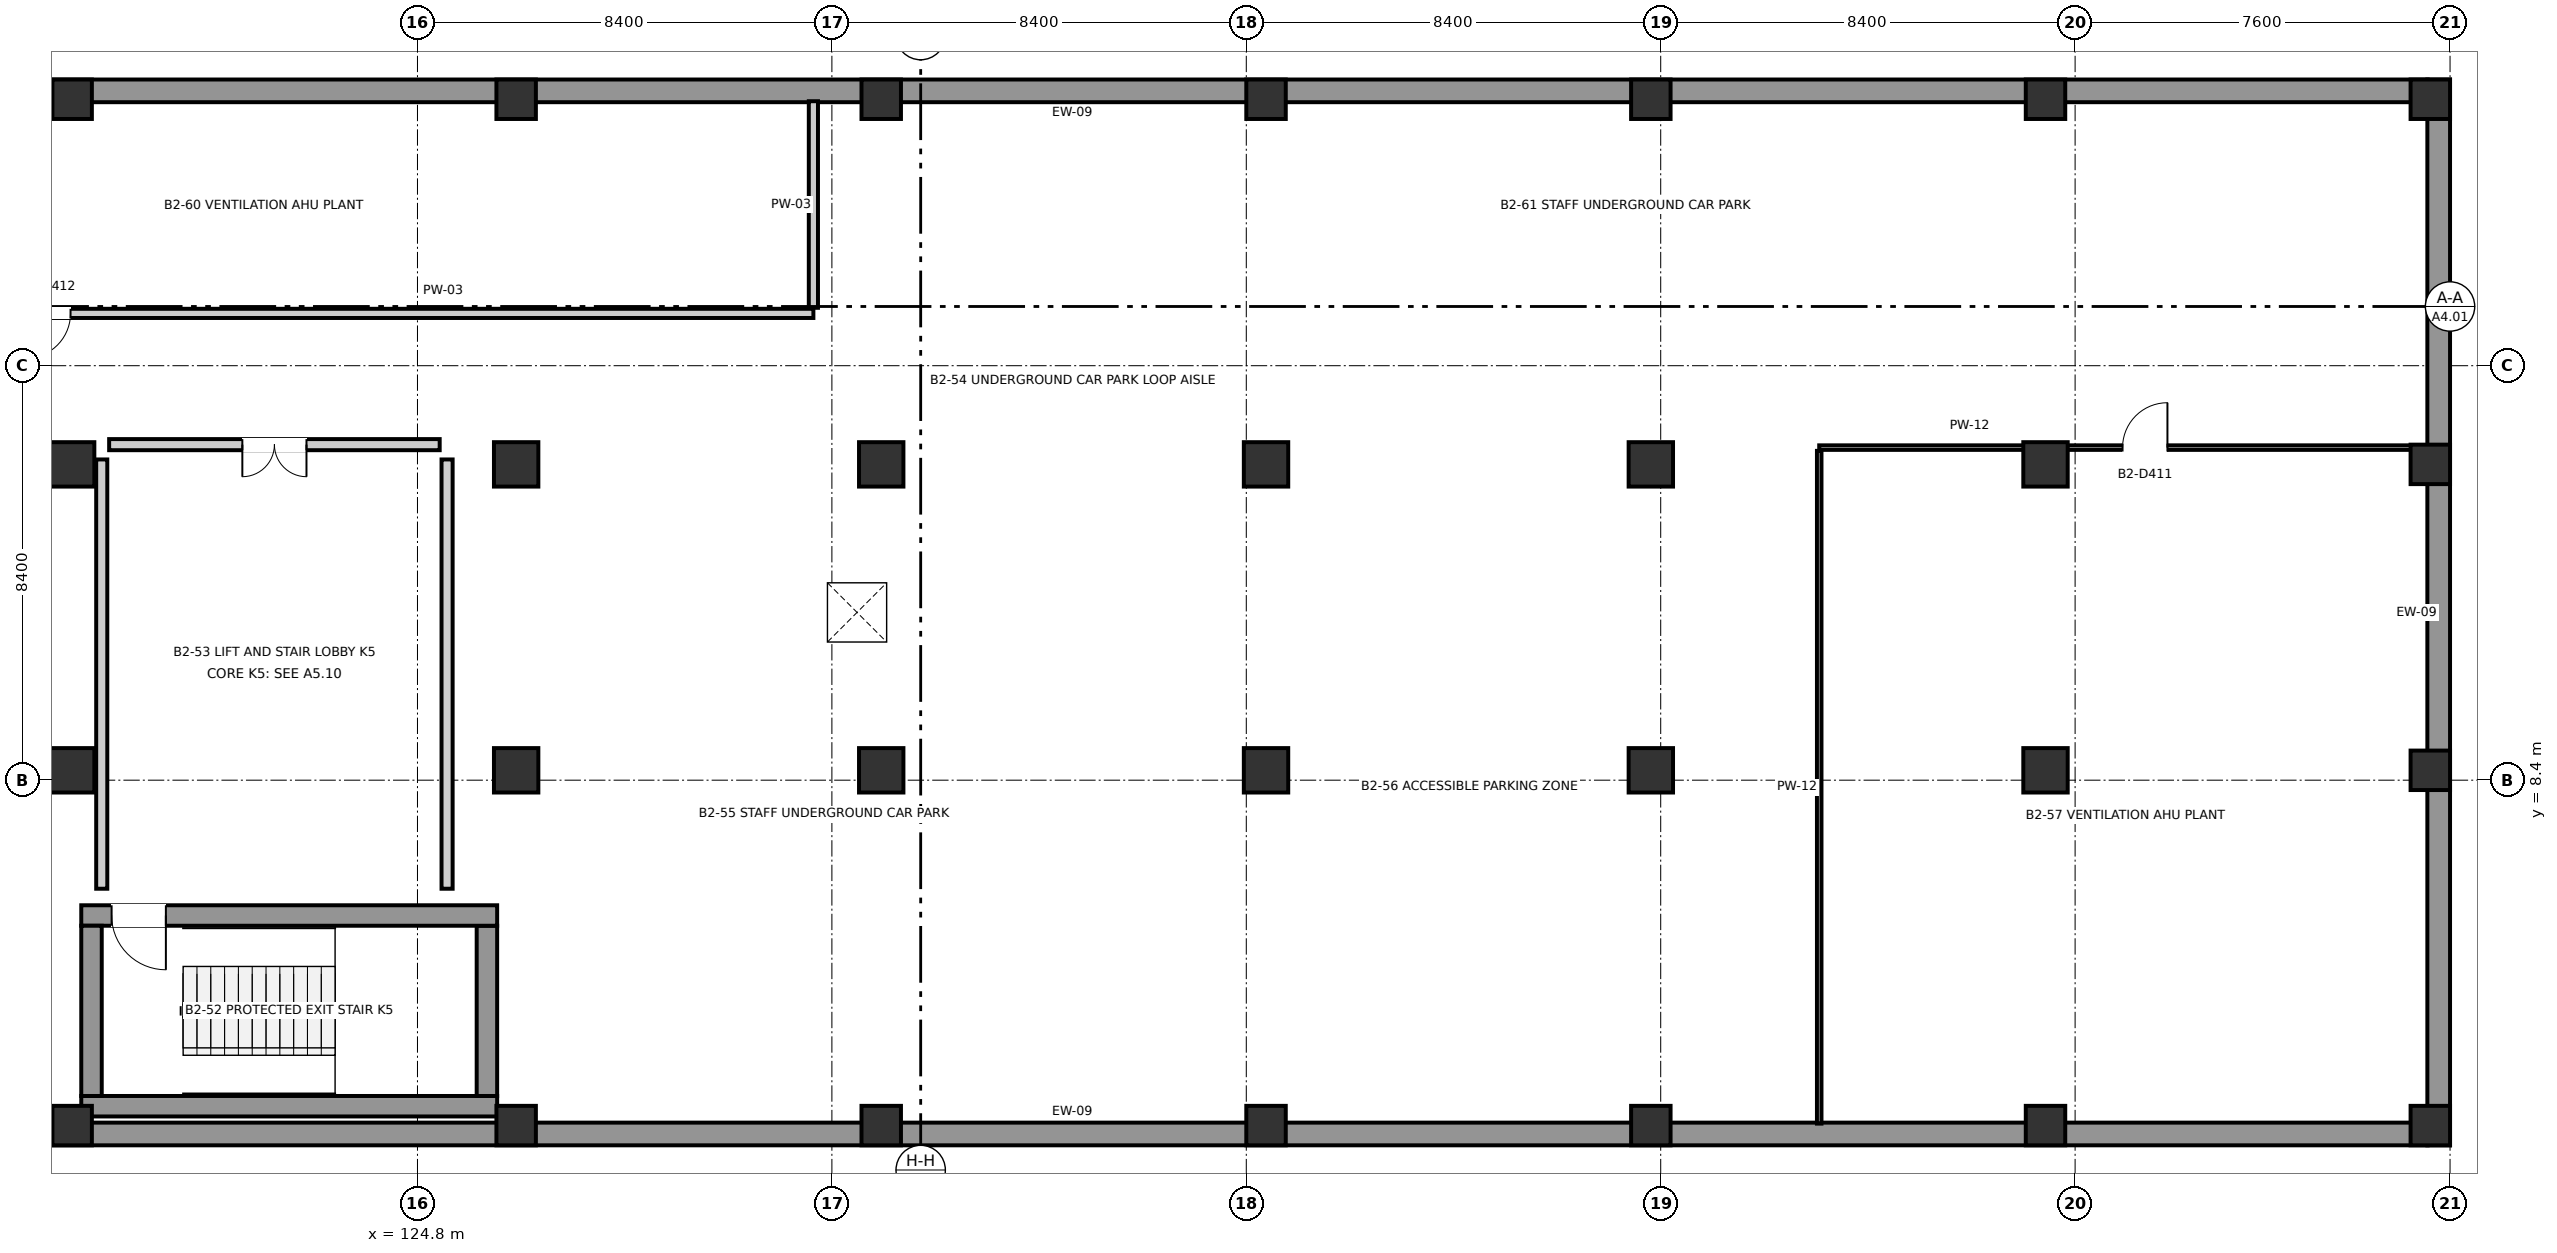
"""IFC4 building model, lengths in metres.
Left out: names, types, materials, properties, quantities, classifications, styles, units other than length and angle.
Written with IfcOpenShell. Run it as: python <this file> out.ifc"""

import sys

from ifc_helpers import new_model, si_unit, direction, frame, frame_2d, origin, origin_2d, place, context, subcontext, project, spatial, rectangle, extrude, element, fill, save


model = new_model("IFC4")
c1 = context("Model", 3, precision=1e-05, world=origin(), true_north=direction((0.0, 1.0)))
c2 = subcontext(c1, "Body", "Model", "MODEL_VIEW")
j1 = project(units=[si_unit("LENGTHUNIT", "METRE"), si_unit("PLANEANGLEUNIT", "RADIAN")], contexts=[c1])
p1 = place(None, origin())
s1 = spatial("IfcSite", under=j1, at=p1, CompositionType="ELEMENT")
p2 = place(p1, origin())
s2 = spatial("IfcBuilding", under=s1, at=p2, CompositionType="ELEMENT")
p3 = place(p2, frame((0.0, 0.0, -8.4)))
s3 = spatial("IfcBuildingStorey", under=s2, at=p3, CompositionType="ELEMENT", Elevation=-8.4)
p4 = place(p3, frame((117.8, 1.4, 0.0), z_axis=(0.0, 0.0, 1.0), x_axis=(1.0, 0.0, 0.0)))
e1 = element("IfcColumn", 1, at=p4, inside=s3, PredefinedType="COLUMN", context=c2, shape_type="SweptSolid", body=[
    extrude(rectangle(XDim=0.8, YDim=0.8, at=origin_2d()), origin(), (0.0, 0.0, 1.0), 4.2),
])
for number, where, z_axis, x_axis in (
    (2, (117.8, 8.6, 0.0), (0.0, 0.0, 1.0), (1.0, 0.0, 0.0)),
    (3, (117.8, 14.8, 0.0), (0.0, 0.0, 1.0), (1.0, 0.0, 0.0)),
):
    element("IfcColumn", number, at=place(p3, frame(where, z_axis=z_axis, x_axis=x_axis)), inside=s3, PredefinedType="COLUMN", context=c2, shape_type="SweptSolid", body=[
        extrude(rectangle(XDim=0.9, YDim=0.9, at=origin_2d()), origin(), (0.0, 0.0, 1.0), 4.2),
    ])
for number, where, z_axis, x_axis in (
    (4, (117.8, 22.2, 0.0), (0.0, 0.0, 1.0), (1.0, 0.0, 0.0)),
    (5, (126.8, 1.4, 0.0), (0.0, 0.0, 1.0), (1.0, 0.0, 0.0)),
):
    element("IfcColumn", number, at=place(p3, frame(where, z_axis=z_axis, x_axis=x_axis)), inside=s3, PredefinedType="COLUMN", context=c2, shape_type="SweptSolid", body=[
        extrude(rectangle(XDim=0.8, YDim=0.8, at=origin_2d()), origin(), (0.0, 0.0, 1.0), 4.2),
    ])
for number, where, z_axis, x_axis in (
    (6, (126.8, 8.6, 0.0), (0.0, 0.0, 1.0), (1.0, 0.0, 0.0)),
    (7, (126.8, 14.8, 0.0), (0.0, 0.0, 1.0), (1.0, 0.0, 0.0)),
):
    element("IfcColumn", number, at=place(p3, frame(where, z_axis=z_axis, x_axis=x_axis)), inside=s3, PredefinedType="COLUMN", context=c2, shape_type="SweptSolid", body=[
        extrude(rectangle(XDim=0.9, YDim=0.9, at=origin_2d()), origin(), (0.0, 0.0, 1.0), 4.2),
    ])
for number, where, z_axis, x_axis in (
    (8, (126.8, 22.2, 0.0), (0.0, 0.0, 1.0), (1.0, 0.0, 0.0)),
    (9, (134.2, 1.4, 0.0), (0.0, 0.0, 1.0), (1.0, 0.0, 0.0)),
):
    element("IfcColumn", number, at=place(p3, frame(where, z_axis=z_axis, x_axis=x_axis)), inside=s3, PredefinedType="COLUMN", context=c2, shape_type="SweptSolid", body=[
        extrude(rectangle(XDim=0.8, YDim=0.8, at=origin_2d()), origin(), (0.0, 0.0, 1.0), 4.2),
    ])
for number, where, z_axis, x_axis in (
    (10, (134.2, 8.6, 0.0), (0.0, 0.0, 1.0), (1.0, 0.0, 0.0)),
    (11, (134.2, 14.8, 0.0), (0.0, 0.0, 1.0), (1.0, 0.0, 0.0)),
):
    element("IfcColumn", number, at=place(p3, frame(where, z_axis=z_axis, x_axis=x_axis)), inside=s3, PredefinedType="COLUMN", context=c2, shape_type="SweptSolid", body=[
        extrude(rectangle(XDim=0.9, YDim=0.9, at=origin_2d()), origin(), (0.0, 0.0, 1.0), 4.2),
    ])
for number, where, z_axis, x_axis in (
    (12, (134.2, 22.2, 0.0), (0.0, 0.0, 1.0), (1.0, 0.0, 0.0)),
    (13, (142.0, 1.4, 0.0), (0.0, 0.0, 1.0), (1.0, 0.0, 0.0)),
):
    element("IfcColumn", number, at=place(p3, frame(where, z_axis=z_axis, x_axis=x_axis)), inside=s3, PredefinedType="COLUMN", context=c2, shape_type="SweptSolid", body=[
        extrude(rectangle(XDim=0.8, YDim=0.8, at=origin_2d()), origin(), (0.0, 0.0, 1.0), 4.2),
    ])
for number, where, z_axis, x_axis in (
    (14, (142.0, 8.6, 0.0), (0.0, 0.0, 1.0), (1.0, 0.0, 0.0)),
    (15, (142.0, 14.8, 0.0), (0.0, 0.0, 1.0), (1.0, 0.0, 0.0)),
):
    element("IfcColumn", number, at=place(p3, frame(where, z_axis=z_axis, x_axis=x_axis)), inside=s3, PredefinedType="COLUMN", context=c2, shape_type="SweptSolid", body=[
        extrude(rectangle(XDim=0.9, YDim=0.9, at=origin_2d()), origin(), (0.0, 0.0, 1.0), 4.2),
    ])
for number, where, z_axis, x_axis in (
    (16, (142.0, 22.2, 0.0), (0.0, 0.0, 1.0), (1.0, 0.0, 0.0)),
    (17, (149.8, 1.4, 0.0), (0.0, 0.0, 1.0), (1.0, 0.0, 0.0)),
):
    element("IfcColumn", number, at=place(p3, frame(where, z_axis=z_axis, x_axis=x_axis)), inside=s3, PredefinedType="COLUMN", context=c2, shape_type="SweptSolid", body=[
        extrude(rectangle(XDim=0.8, YDim=0.8, at=origin_2d()), origin(), (0.0, 0.0, 1.0), 4.2),
    ])
for number, where, z_axis, x_axis in (
    (18, (149.8, 8.6, 0.0), (0.0, 0.0, 1.0), (1.0, 0.0, 0.0)),
    (19, (149.8, 14.8, 0.0), (0.0, 0.0, 1.0), (1.0, 0.0, 0.0)),
):
    element("IfcColumn", number, at=place(p3, frame(where, z_axis=z_axis, x_axis=x_axis)), inside=s3, PredefinedType="COLUMN", context=c2, shape_type="SweptSolid", body=[
        extrude(rectangle(XDim=0.9, YDim=0.9, at=origin_2d()), origin(), (0.0, 0.0, 1.0), 4.2),
    ])
for number, where, z_axis, x_axis in (
    (20, (149.8, 22.2, 0.0), (0.0, 0.0, 1.0), (1.0, 0.0, 0.0)),
    (21, (157.8, 1.4, 0.0), (0.0, 0.0, 1.0), (1.0, 0.0, 0.0)),
):
    element("IfcColumn", number, at=place(p3, frame(where, z_axis=z_axis, x_axis=x_axis)), inside=s3, PredefinedType="COLUMN", context=c2, shape_type="SweptSolid", body=[
        extrude(rectangle(XDim=0.8, YDim=0.8, at=origin_2d()), origin(), (0.0, 0.0, 1.0), 4.2),
    ])
for number, where, z_axis, x_axis in (
    (22, (157.8, 8.6, 0.0), (0.0, 0.0, 1.0), (1.0, 0.0, 0.0)),
    (23, (157.8, 14.8, 0.0), (0.0, 0.0, 1.0), (1.0, 0.0, 0.0)),
):
    element("IfcColumn", number, at=place(p3, frame(where, z_axis=z_axis, x_axis=x_axis)), inside=s3, PredefinedType="COLUMN", context=c2, shape_type="SweptSolid", body=[
        extrude(rectangle(XDim=0.9, YDim=0.9, at=origin_2d()), origin(), (0.0, 0.0, 1.0), 4.2),
    ])
for number, where, z_axis, x_axis in (
    (24, (157.8, 22.2, 0.0), (0.0, 0.0, 1.0), (1.0, 0.0, 0.0)),
    (25, (165.6, 1.4, 0.0), (0.0, 0.0, 1.0), (1.0, 0.0, 0.0)),
    (26, (165.6, 8.6, 0.0), (0.0, 0.0, 1.0), (1.0, 0.0, 0.0)),
    (27, (165.6, 14.8, 0.0), (0.0, 0.0, 1.0), (1.0, 0.0, 0.0)),
    (28, (165.6, 22.2, 0.0), (0.0, 0.0, 1.0), (1.0, 0.0, 0.0)),
):
    element("IfcColumn", number, at=place(p3, frame(where, z_axis=z_axis, x_axis=x_axis)), inside=s3, PredefinedType="COLUMN", context=c2, shape_type="SweptSolid", body=[
        extrude(rectangle(XDim=0.8, YDim=0.8, at=origin_2d()), origin(), (0.0, 0.0, 1.0), 4.2),
    ])
p5 = place(p3, frame((101.875, 1.23, 0.0), z_axis=(0.0, 0.0, 1.0), x_axis=(1.0, 0.0, 0.0)))
e29 = element("IfcWall", 29, at=p5, inside=s3, PredefinedType="SOLIDWALL", context=c2, shape_type="SweptSolid", body=[
    extrude(rectangle(XDim=63.67, YDim=0.46, at=frame_2d((31.835, 0.0))), origin(), (0.0, 0.0, 1.0), 4.2),
])
p6 = place(p3, frame((165.77, 1.0, 0.0), z_axis=(0.0, 0.0, 1.0), x_axis=(0.0, 1.0, 0.0)))
e30 = element("IfcWall", 30, at=p6, inside=s3, PredefinedType="SOLIDWALL", context=c2, shape_type="SweptSolid", body=[
    extrude(rectangle(XDim=21.6, YDim=0.46, at=frame_2d((10.8, 0.0))), origin(), (0.0, 0.0, 1.0), 4.2),
])
p7 = place(p3, frame((165.545, 22.37, 0.0), z_axis=(0.0, 0.0, 1.0), x_axis=(-1.0, 0.0, 0.0)))
e31 = element("IfcWall", 31, at=p7, inside=s3, PredefinedType="SOLIDWALL", context=c2, shape_type="SweptSolid", body=[
    extrude(rectangle(XDim=63.67, YDim=0.46, at=frame_2d((31.835, 0.0))), origin(), (0.0, 0.0, 1.0), 4.2),
])
p8 = place(p3, frame((117.985, 1.792, 0.0), z_axis=(0.0, 0.0, 1.0), x_axis=(1.0, 0.0, 0.0)))
e32 = element("IfcWall", 32, at=p8, inside=s3, PredefinedType="SHEAR", context=c2, shape_type="SweptSolid", body=[
    extrude(rectangle(XDim=8.43, YDim=0.415, at=frame_2d((4.215, 0.0))), origin(), (0.0, 0.0, 1.0), 4.2),
])
p9 = place(p3, frame((126.208, 2.0, 0.0), z_axis=(0.0, 0.0, 1.0), x_axis=(0.0, 1.0, 0.0)))
e33 = element("IfcWall", 33, at=p9, inside=s3, PredefinedType="SHEAR", context=c2, shape_type="SweptSolid", body=[
    extrude(rectangle(XDim=3.45, YDim=0.415, at=frame_2d((1.725, 0.0))), origin(), (0.0, 0.0, 1.0), 4.2),
])
p10 = place(p3, frame((126.415, 5.657, 0.0), z_axis=(0.0, 0.0, 1.0), x_axis=(-1.0, 0.0, 0.0)))
e34 = element("IfcWall", 34, at=p10, inside=s3, PredefinedType="SHEAR", context=c2, shape_type="SweptSolid", body=[
    extrude(rectangle(XDim=8.43, YDim=0.415, at=frame_2d((4.215, 0.0))), origin(), (0.0, 0.0, 1.0), 4.2),
])
p11 = place(p10, frame((6.715, 0.0, 0.0)))
e35 = element("IfcOpeningElement", 35, at=p11, cuts=e34, PredefinedType="OPENING", context=c2, shape_type="SweptSolid", body=[
    extrude(rectangle(XDim=1.1, YDim=2.15, at=frame_2d((0.55, 1.075))), frame((0.0, 0.222, 0.0), z_axis=(0.0, -1.0, 0.0), x_axis=(1.0, 0.0, 0.0)), (0.0, 0.0, 1.0), 0.445),
])
p12 = place(p3, frame((118.192, 5.45, 0.0), z_axis=(0.0, 0.0, 1.0), x_axis=(0.0, -1.0, 0.0)))
e36 = element("IfcWall", 36, at=p12, inside=s3, PredefinedType="SHEAR", context=c2, shape_type="SweptSolid", body=[
    extrude(rectangle(XDim=3.45, YDim=0.415, at=frame_2d((1.725, 0.0))), origin(), (0.0, 0.0, 1.0), 4.2),
])
p13 = place(p3, frame((118.55, 15.2, 0.0), z_axis=(0.0, 0.0, 1.0), x_axis=(1.0, 0.0, 0.0)))
e37 = element("IfcWall", 37, at=p13, inside=s3, PredefinedType="PARTITIONING", context=c2, shape_type="SweptSolid", body=[
    extrude(rectangle(XDim=6.7, YDim=0.225, at=frame_2d((3.35, 0.0))), origin(), (0.0, 0.0, 1.0), 3.01),
])
p14 = place(p13, frame((2.7, 0.0, 0.0)))
e38 = element("IfcOpeningElement", 38, at=p14, cuts=e37, PredefinedType="OPENING", context=c2, shape_type="SweptSolid", body=[
    extrude(rectangle(XDim=1.3, YDim=2.15, at=frame_2d((0.65, 1.075))), frame((0.0, 0.127, 0.0), z_axis=(0.0, -1.0, 0.0), x_axis=(1.0, 0.0, 0.0)), (0.0, 0.0, 1.0), 0.255),
])
for number, where, z_axis, x_axis in (
    (39, (118.4, 6.2, 0.0), (0.0, 0.0, 1.0), (0.0, 1.0, 0.0)),
    (40, (125.4, 6.2, 0.0), (0.0, 0.0, 1.0), (0.0, 1.0, 0.0)),
):
    element("IfcWall", number, at=place(p3, frame(where, z_axis=z_axis, x_axis=x_axis)), inside=s3, PredefinedType="PARTITIONING", context=c2, shape_type="SweptSolid", body=[
        extrude(rectangle(XDim=8.7, YDim=0.225, at=frame_2d((4.35, 0.0))), origin(), (0.0, 0.0, 1.0), 3.88),
    ])
p15 = place(p3, frame((153.213, 15.14, 0.0), z_axis=(0.0, 0.0, 1.0), x_axis=(1.0, 0.0, 0.0)))
e41 = element("IfcWall", 41, at=p15, inside=s3, PredefinedType="PARTITIONING", context=c2, shape_type="SweptSolid", body=[
    extrude(rectangle(XDim=12.407, YDim=0.092, at=frame_2d((6.204, 0.0))), origin(), (0.0, 0.0, 1.0), 3.11),
])
p16 = place(p15, frame((6.148, 0.0, 0.0)))
e42 = element("IfcOpeningElement", 42, at=p16, cuts=e41, PredefinedType="OPENING", context=c2, shape_type="SweptSolid", body=[
    extrude(rectangle(XDim=0.91, YDim=2.04, at=frame_2d((0.455, 1.02))), frame((0.0, 0.061, 0.0), z_axis=(0.0, -1.0, 0.0), x_axis=(1.0, 0.0, 0.0)), (0.0, 0.0, 1.0), 0.122),
])
p17 = place(p3, frame((153.213, 1.44, 0.0), z_axis=(0.0, 0.0, 1.0), x_axis=(0.0, 1.0, 0.0)))
e43 = element("IfcWall", 43, at=p17, inside=s3, PredefinedType="PARTITIONING", context=c2, shape_type="SweptSolid", body=[
    extrude(rectangle(XDim=13.634, YDim=0.092, at=frame_2d((6.817, 0.0))), origin(), (0.0, 0.0, 1.0), 3.88),
])
p18 = place(p3, frame((101.8, 17.86, 0.0), z_axis=(0.0, 0.0, 1.0), x_axis=(1.0, 0.0, 0.0)))
e44 = element("IfcWall", 44, at=p18, inside=s3, PredefinedType="PARTITIONING", context=c2, shape_type="SweptSolid", body=[
    extrude(rectangle(XDim=31.025, YDim=0.186, at=frame_2d((15.512, 0.0))), origin(), (0.0, 0.0, 1.0), 3.88),
])
p19 = place(p18, frame((15.058, 0.0, 0.0)))
e45 = element("IfcOpeningElement", 45, at=p19, cuts=e44, PredefinedType="OPENING", context=c2, shape_type="SweptSolid", body=[
    extrude(rectangle(XDim=0.91, YDim=2.04, at=frame_2d((0.455, 1.02))), frame((0.0, 0.108, 0.0), z_axis=(0.0, -1.0, 0.0), x_axis=(1.0, 0.0, 0.0)), (0.0, 0.0, 1.0), 0.216),
])
p20 = place(p3, frame((132.825, 17.973, 0.0), z_axis=(0.0, 0.0, 1.0), x_axis=(0.0, 1.0, 0.0)))
e46 = element("IfcWall", 46, at=p20, inside=s3, PredefinedType="PARTITIONING", context=c2, shape_type="SweptSolid", body=[
    extrude(rectangle(XDim=4.187, YDim=0.186, at=frame_2d((2.094, 0.0))), origin(), (0.0, 0.0, 1.0), 3.88),
])
p21 = place(p11, frame((1.1, 0.0, 0.0), z_axis=(0.0, 0.0, 1.0), x_axis=(-1.0, 0.0, 0.0)))
e47 = element("IfcDoor", 47, at=p21, inside=s3, OperationType="SINGLE_SWING_LEFT", PredefinedType="DOOR", context=c2, shape_type="SweptSolid", body=[
    extrude(rectangle(XDim=1.1, YDim=2.15, at=frame_2d((0.55, 1.075))), frame((0.0, 0.025, 0.0), z_axis=(0.0, -1.0, 0.0), x_axis=(1.0, 0.0, 0.0)), (0.0, 0.0, 1.0), 0.05),
])
fill(e35, e47)
p22 = place(p14, origin())
e48 = element("IfcDoor", 48, at=p22, inside=s3, OperationType="DOUBLE_DOOR_SINGLE_SWING", PredefinedType="DOOR", context=c2, shape_type="SweptSolid", body=[
    extrude(rectangle(XDim=1.3, YDim=2.15, at=frame_2d((0.65, 1.075))), frame((0.0, 0.025, 0.0), z_axis=(0.0, -1.0, 0.0), x_axis=(1.0, 0.0, 0.0)), (0.0, 0.0, 1.0), 0.05),
])
fill(e38, e48)
p23 = place(p16, frame((0.91, 0.0, 0.0), z_axis=(0.0, 0.0, 1.0), x_axis=(-1.0, 0.0, 0.0)))
e49 = element("IfcDoor", 49, at=p23, inside=s3, OperationType="SINGLE_SWING_RIGHT", PredefinedType="DOOR", context=c2, shape_type="SweptSolid", body=[
    extrude(rectangle(XDim=0.91, YDim=2.04, at=frame_2d((0.455, 1.02))), frame((0.0, 0.025, 0.0), z_axis=(0.0, -1.0, 0.0), x_axis=(1.0, 0.0, 0.0)), (0.0, 0.0, 1.0), 0.05),
])
fill(e42, e49)
p24 = place(p19, origin())
e50 = element("IfcDoor", 50, at=p24, inside=s3, OperationType="SINGLE_SWING_LEFT", PredefinedType="DOOR", context=c2, shape_type="SweptSolid", body=[
    extrude(rectangle(XDim=0.91, YDim=2.04, at=frame_2d((0.455, 1.02))), frame((0.0, 0.025, 0.0), z_axis=(0.0, -1.0, 0.0), x_axis=(1.0, 0.0, 0.0)), (0.0, 0.0, 1.0), 0.05),
])
fill(e45, e50)
save(model, sys.argv[1])
